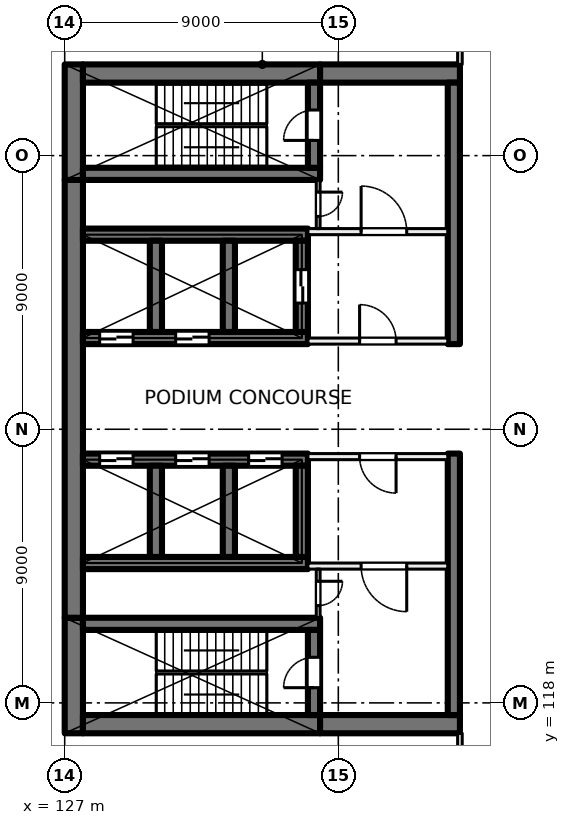
"""IFC4 building model, lengths in metres.
Left out: names, types, materials, properties, quantities, classifications, styles, units other than length and angle.
Written with IfcOpenShell. Run it as: python <this file> out.ifc"""

import sys

from ifc_helpers import new_model, si_unit, direction, frame, frame_2d, origin, place, context, subcontext, project, spatial, rectangle, extrude, element, fill, save


model = new_model("IFC4")
c1 = context("Model", 3, precision=1e-05, world=origin(), true_north=direction((0.0, 1.0)))
c2 = subcontext(c1, "Body", "Model", "MODEL_VIEW")
j1 = project(units=[si_unit("LENGTHUNIT", "METRE"), si_unit("PLANEANGLEUNIT", "RADIAN")], contexts=[c1])
p1 = place(None, origin())
s1 = spatial("IfcSite", under=j1, at=p1, CompositionType="ELEMENT")
p2 = place(p1, origin())
s2 = spatial("IfcBuilding", under=s1, at=p2, CompositionType="ELEMENT")
p3 = place(p2, frame((0.0, 0.0, 12.5)))
s3 = spatial("IfcBuildingStorey", under=s2, at=p3, CompositionType="ELEMENT", Elevation=12.5)
p4 = place(p3, frame((127.3, 117.0, 0.0), z_axis=(0.0, 0.0, 1.0), x_axis=(0.0, 1.0, 0.0)))
e1 = element("IfcWall", 1, at=p4, inside=s3, PredefinedType="SHEAR", context=c2, shape_type="SweptSolid", body=[
    extrude(rectangle(XDim=3.8, YDim=0.6, at=frame_2d((1.9, 0.0))), origin(), (0.0, 0.0, 1.0), 5.0),
])
p5 = place(p3, frame((127.3, 120.8, 0.0), z_axis=(0.0, 0.0, 1.0), x_axis=(0.0, 1.0, 0.0)))
e2 = element("IfcWall", 2, at=p5, inside=s3, PredefinedType="SHEAR", context=c2, shape_type="SweptSolid", body=[
    extrude(rectangle(XDim=14.4, YDim=0.6, at=frame_2d((7.2, 0.0))), origin(), (0.0, 0.0, 1.0), 5.0),
])
p6 = place(p3, frame((127.3, 135.2, 0.0), z_axis=(0.0, 0.0, 1.0), x_axis=(0.0, 1.0, 0.0)))
e3 = element("IfcWall", 3, at=p6, inside=s3, PredefinedType="SHEAR", context=c2, shape_type="SweptSolid", body=[
    extrude(rectangle(XDim=3.8, YDim=0.6, at=frame_2d((1.9, 0.0))), origin(), (0.0, 0.0, 1.0), 5.0),
])
for number, where, z_axis, x_axis in (
    (4, (127.6, 117.3, 0.0), (0.0, 0.0, 1.0), (1.0, 0.0, 0.0)),
    (5, (127.6, 138.7, 0.0), (0.0, 0.0, 1.0), (1.0, 0.0, 0.0)),
):
    element("IfcWall", number, at=place(p3, frame(where, z_axis=z_axis, x_axis=x_axis)), inside=s3, PredefinedType="SHEAR", context=c2, shape_type="SweptSolid", body=[
        extrude(rectangle(XDim=7.8, YDim=0.6, at=frame_2d((3.9, 0.0))), origin(), (0.0, 0.0, 1.0), 5.0),
    ])
for number, where, z_axis, x_axis in (
    (6, (135.4, 117.3, 0.0), (0.0, 0.0, 1.0), (1.0, 0.0, 0.0)),
    (7, (135.4, 138.7, 0.0), (0.0, 0.0, 1.0), (1.0, 0.0, 0.0)),
):
    element("IfcWall", number, at=place(p3, frame(where, z_axis=z_axis, x_axis=x_axis)), inside=s3, PredefinedType="SHEAR", context=c2, shape_type="SweptSolid", body=[
        extrude(rectangle(XDim=4.6, YDim=0.6, at=frame_2d((2.3, 0.0))), origin(), (0.0, 0.0, 1.0), 5.0),
    ])
p7 = place(p3, frame((127.6, 120.6, 0.0), z_axis=(0.0, 0.0, 1.0), x_axis=(1.0, 0.0, 0.0)))
e8 = element("IfcWall", 8, at=p7, inside=s3, PredefinedType="SHEAR", context=c2, shape_type="SweptSolid", body=[
    extrude(rectangle(XDim=7.8, YDim=0.4, at=frame_2d((3.9, 0.0))), origin(), (0.0, 0.0, 1.0), 5.0),
])
p8 = place(p3, frame((135.2, 117.6, 0.0), z_axis=(0.0, 0.0, 1.0), x_axis=(0.0, 1.0, 0.0)))
e9 = element("IfcWall", 9, at=p8, inside=s3, PredefinedType="SHEAR", context=c2, shape_type="SweptSolid", body=[
    extrude(rectangle(XDim=2.8, YDim=0.4, at=frame_2d((1.4, 0.0))), origin(), (0.0, 0.0, 1.0), 5.0),
])
p9 = place(p8, frame((0.9, 0.0, 0.0)))
e10 = element("IfcOpeningElement", 10, at=p9, cuts=e9, PredefinedType="OPENING", context=c2, shape_type="SweptSolid", body=[
    extrude(rectangle(XDim=1.0, YDim=2.1, at=frame_2d((0.5, 1.05))), frame((0.0, 0.21, 0.0), z_axis=(0.0, -1.0, 0.0), x_axis=(1.0, 0.0, 0.0)), (0.0, 0.0, 1.0), 0.42),
])
p10 = place(p3, frame((127.6, 135.4, 0.0), z_axis=(0.0, 0.0, 1.0), x_axis=(1.0, 0.0, 0.0)))
e11 = element("IfcWall", 11, at=p10, inside=s3, PredefinedType="SHEAR", context=c2, shape_type="SweptSolid", body=[
    extrude(rectangle(XDim=7.8, YDim=0.4, at=frame_2d((3.9, 0.0))), origin(), (0.0, 0.0, 1.0), 5.0),
])
p11 = place(p3, frame((135.2, 135.6, 0.0), z_axis=(0.0, 0.0, 1.0), x_axis=(0.0, 1.0, 0.0)))
e12 = element("IfcWall", 12, at=p11, inside=s3, PredefinedType="SHEAR", context=c2, shape_type="SweptSolid", body=[
    extrude(rectangle(XDim=2.8, YDim=0.4, at=frame_2d((1.4, 0.0))), origin(), (0.0, 0.0, 1.0), 5.0),
])
p12 = place(p11, frame((0.9, 0.0, 0.0)))
e13 = element("IfcOpeningElement", 13, at=p12, cuts=e12, PredefinedType="OPENING", context=c2, shape_type="SweptSolid", body=[
    extrude(rectangle(XDim=1.0, YDim=2.1, at=frame_2d((0.5, 1.05))), frame((0.0, 0.21, 0.0), z_axis=(0.0, -1.0, 0.0), x_axis=(1.0, 0.0, 0.0)), (0.0, 0.0, 1.0), 0.42),
])
p13 = place(p3, frame((127.6, 126.0, 0.0), z_axis=(0.0, 0.0, 1.0), x_axis=(1.0, 0.0, 0.0)))
e14 = element("IfcWall", 14, at=p13, inside=s3, PredefinedType="SHEAR", context=c2, shape_type="SweptSolid", body=[
    extrude(rectangle(XDim=7.4, YDim=0.4, at=frame_2d((3.7, 0.0))), origin(), (0.0, 0.0, 1.0), 5.0),
])
p14 = place(p13, frame((0.55, 0.0, 0.0)))
e15 = element("IfcOpeningElement", 15, at=p14, cuts=e14, PredefinedType="OPENING", context=c2, shape_type="SweptSolid", body=[
    extrude(rectangle(XDim=1.1, YDim=2.1, at=frame_2d((0.55, 1.05))), frame((0.0, 0.21, 0.0), z_axis=(0.0, -1.0, 0.0), x_axis=(1.0, 0.0, 0.0)), (0.0, 0.0, 1.0), 0.42),
])
p15 = place(p13, frame((3.05, 0.0, 0.0)))
e16 = element("IfcOpeningElement", 16, at=p15, cuts=e14, PredefinedType="OPENING", context=c2, shape_type="SweptSolid", body=[
    extrude(rectangle(XDim=1.1, YDim=2.1, at=frame_2d((0.55, 1.05))), frame((0.0, 0.21, 0.0), z_axis=(0.0, -1.0, 0.0), x_axis=(1.0, 0.0, 0.0)), (0.0, 0.0, 1.0), 0.42),
])
p16 = place(p13, frame((5.45, 0.0, 0.0)))
e17 = element("IfcOpeningElement", 17, at=p16, cuts=e14, PredefinedType="OPENING", context=c2, shape_type="SweptSolid", body=[
    extrude(rectangle(XDim=1.1, YDim=2.1, at=frame_2d((0.55, 1.05))), frame((0.0, 0.21, 0.0), z_axis=(0.0, -1.0, 0.0), x_axis=(1.0, 0.0, 0.0)), (0.0, 0.0, 1.0), 0.42),
])
p17 = place(p3, frame((127.6, 122.6, 0.0), z_axis=(0.0, 0.0, 1.0), x_axis=(1.0, 0.0, 0.0)))
e18 = element("IfcWall", 18, at=p17, inside=s3, PredefinedType="SHEAR", context=c2, shape_type="SweptSolid", body=[
    extrude(rectangle(XDim=7.4, YDim=0.4, at=frame_2d((3.7, 0.0))), origin(), (0.0, 0.0, 1.0), 5.0),
])
for number, where, z_axis, x_axis in (
    (19, (130.0, 122.8, 0.0), (0.0, 0.0, 1.0), (0.0, 1.0, 0.0)),
    (20, (132.4, 122.8, 0.0), (0.0, 0.0, 1.0), (0.0, 1.0, 0.0)),
    (21, (134.8, 122.8, 0.0), (0.0, 0.0, 1.0), (0.0, 1.0, 0.0)),
):
    element("IfcWall", number, at=place(p3, frame(where, z_axis=z_axis, x_axis=x_axis)), inside=s3, PredefinedType="SHEAR", context=c2, shape_type="SweptSolid", body=[
        extrude(rectangle(XDim=3.0, YDim=0.4, at=frame_2d((1.5, 0.0))), origin(), (0.0, 0.0, 1.0), 5.0),
    ])
p18 = place(p3, frame((127.6, 130.0, 0.0), z_axis=(0.0, 0.0, 1.0), x_axis=(1.0, 0.0, 0.0)))
e22 = element("IfcWall", 22, at=p18, inside=s3, PredefinedType="SHEAR", context=c2, shape_type="SweptSolid", body=[
    extrude(rectangle(XDim=7.4, YDim=0.4, at=frame_2d((3.7, 0.0))), origin(), (0.0, 0.0, 1.0), 5.0),
])
p19 = place(p18, frame((0.55, 0.0, 0.0)))
e23 = element("IfcOpeningElement", 23, at=p19, cuts=e22, PredefinedType="OPENING", context=c2, shape_type="SweptSolid", body=[
    extrude(rectangle(XDim=1.1, YDim=2.1, at=frame_2d((0.55, 1.05))), frame((0.0, 0.21, 0.0), z_axis=(0.0, -1.0, 0.0), x_axis=(1.0, 0.0, 0.0)), (0.0, 0.0, 1.0), 0.42),
])
p20 = place(p18, frame((3.05, 0.0, 0.0)))
e24 = element("IfcOpeningElement", 24, at=p20, cuts=e22, PredefinedType="OPENING", context=c2, shape_type="SweptSolid", body=[
    extrude(rectangle(XDim=1.1, YDim=2.1, at=frame_2d((0.55, 1.05))), frame((0.0, 0.21, 0.0), z_axis=(0.0, -1.0, 0.0), x_axis=(1.0, 0.0, 0.0)), (0.0, 0.0, 1.0), 0.42),
])
p21 = place(p3, frame((127.6, 133.4, 0.0), z_axis=(0.0, 0.0, 1.0), x_axis=(1.0, 0.0, 0.0)))
e25 = element("IfcWall", 25, at=p21, inside=s3, PredefinedType="SHEAR", context=c2, shape_type="SweptSolid", body=[
    extrude(rectangle(XDim=7.4, YDim=0.4, at=frame_2d((3.7, 0.0))), origin(), (0.0, 0.0, 1.0), 5.0),
])
for number, where, z_axis, x_axis in (
    (26, (130.0, 130.2, 0.0), (0.0, 0.0, 1.0), (0.0, 1.0, 0.0)),
    (27, (132.4, 130.2, 0.0), (0.0, 0.0, 1.0), (0.0, 1.0, 0.0)),
):
    element("IfcWall", number, at=place(p3, frame(where, z_axis=z_axis, x_axis=x_axis)), inside=s3, PredefinedType="SHEAR", context=c2, shape_type="SweptSolid", body=[
        extrude(rectangle(XDim=3.0, YDim=0.4, at=frame_2d((1.5, 0.0))), origin(), (0.0, 0.0, 1.0), 5.0),
    ])
p22 = place(p3, frame((134.8, 130.2, 0.0), z_axis=(0.0, 0.0, 1.0), x_axis=(0.0, 1.0, 0.0)))
e28 = element("IfcWall", 28, at=p22, inside=s3, PredefinedType="SHEAR", context=c2, shape_type="SweptSolid", body=[
    extrude(rectangle(XDim=3.0, YDim=0.4, at=frame_2d((1.5, 0.0))), origin(), (0.0, 0.0, 1.0), 5.0),
])
p23 = place(p22, frame((0.95, 0.0, 0.0)))
e29 = element("IfcOpeningElement", 29, at=p23, cuts=e28, PredefinedType="OPENING", context=c2, shape_type="SweptSolid", body=[
    extrude(rectangle(XDim=1.1, YDim=2.1, at=frame_2d((0.55, 1.05))), frame((0.0, 0.21, 0.0), z_axis=(0.0, -1.0, 0.0), x_axis=(1.0, 0.0, 0.0)), (0.0, 0.0, 1.0), 0.42),
])
for number, where, z_axis, x_axis in (
    (30, (139.8, 117.6, 0.0), (0.0, 0.0, 1.0), (0.0, 1.0, 0.0)),
    (31, (139.8, 129.8, 0.0), (0.0, 0.0, 1.0), (0.0, 1.0, 0.0)),
):
    element("IfcWall", number, at=place(p3, frame(where, z_axis=z_axis, x_axis=x_axis)), inside=s3, PredefinedType="SHEAR", context=c2, shape_type="SweptSolid", body=[
        extrude(rectangle(XDim=8.6, YDim=0.4, at=frame_2d((4.3, 0.0))), origin(), (0.0, 0.0, 1.0), 5.0),
    ])
p24 = place(p3, frame((135.0, 129.9, 0.0), z_axis=(0.0, 0.0, 1.0), x_axis=(1.0, 0.0, 0.0)))
e32 = element("IfcWall", 32, at=p24, inside=s3, PredefinedType="PARTITIONING", context=c2, shape_type="SweptSolid", body=[
    extrude(rectangle(XDim=4.6, YDim=0.2, at=frame_2d((2.3, 0.0))), origin(), (0.0, 0.0, 1.0), 4.6),
])
p25 = place(p24, frame((1.7, 0.0, 0.0)))
e33 = element("IfcOpeningElement", 33, at=p25, cuts=e32, PredefinedType="OPENING", context=c2, shape_type="SweptSolid", body=[
    extrude(rectangle(XDim=1.2, YDim=2.1, at=frame_2d((0.6, 1.05))), frame((0.0, 0.11, 0.0), z_axis=(0.0, -1.0, 0.0), x_axis=(1.0, 0.0, 0.0)), (0.0, 0.0, 1.0), 0.22),
])
p26 = place(p3, frame((135.0, 133.5, 0.0), z_axis=(0.0, 0.0, 1.0), x_axis=(1.0, 0.0, 0.0)))
e34 = element("IfcWall", 34, at=p26, inside=s3, PredefinedType="PARTITIONING", context=c2, shape_type="SweptSolid", body=[
    extrude(rectangle(XDim=4.6, YDim=0.2, at=frame_2d((2.3, 0.0))), origin(), (0.0, 0.0, 1.0), 4.6),
])
p27 = place(p26, frame((1.75, 0.0, 0.0)))
e35 = element("IfcOpeningElement", 35, at=p27, cuts=e34, PredefinedType="OPENING", context=c2, shape_type="SweptSolid", body=[
    extrude(rectangle(XDim=1.5, YDim=2.1, at=frame_2d((0.75, 1.05))), frame((0.0, 0.11, 0.0), z_axis=(0.0, -1.0, 0.0), x_axis=(1.0, 0.0, 0.0)), (0.0, 0.0, 1.0), 0.22),
])
p28 = place(p3, frame((135.337, 135.2, 0.0), z_axis=(0.0, 0.0, 1.0), x_axis=(0.0, -1.0, 0.0)))
e36 = element("IfcWall", 36, at=p28, inside=s3, PredefinedType="PARTITIONING", context=c2, shape_type="SweptSolid", body=[
    extrude(rectangle(XDim=1.6, YDim=0.125, at=frame_2d((0.8, 0.0))), origin(), (0.0, 0.0, 1.0), 4.6),
])
p29 = place(p28, frame((0.4, 0.0, 0.0)))
e37 = element("IfcOpeningElement", 37, at=p29, cuts=e36, PredefinedType="OPENING", context=c2, shape_type="SweptSolid", body=[
    extrude(rectangle(XDim=0.8, YDim=2.1, at=frame_2d((0.4, 1.05))), frame((0.0, 0.073, 0.0), z_axis=(0.0, -1.0, 0.0), x_axis=(1.0, 0.0, 0.0)), (0.0, 0.0, 1.0), 0.145),
])
p30 = place(p3, frame((139.6, 126.1, 0.0), z_axis=(0.0, 0.0, 1.0), x_axis=(-1.0, 0.0, 0.0)))
e38 = element("IfcWall", 38, at=p30, inside=s3, PredefinedType="PARTITIONING", context=c2, shape_type="SweptSolid", body=[
    extrude(rectangle(XDim=4.6, YDim=0.2, at=frame_2d((2.3, 0.0))), origin(), (0.0, 0.0, 1.0), 4.6),
])
p31 = place(p30, frame((1.7, 0.0, 0.0)))
e39 = element("IfcOpeningElement", 39, at=p31, cuts=e38, PredefinedType="OPENING", context=c2, shape_type="SweptSolid", body=[
    extrude(rectangle(XDim=1.2, YDim=2.1, at=frame_2d((0.6, 1.05))), frame((0.0, 0.11, 0.0), z_axis=(0.0, -1.0, 0.0), x_axis=(1.0, 0.0, 0.0)), (0.0, 0.0, 1.0), 0.22),
])
p32 = place(p3, frame((139.6, 122.5, 0.0), z_axis=(0.0, 0.0, 1.0), x_axis=(-1.0, 0.0, 0.0)))
e40 = element("IfcWall", 40, at=p32, inside=s3, PredefinedType="PARTITIONING", context=c2, shape_type="SweptSolid", body=[
    extrude(rectangle(XDim=4.6, YDim=0.2, at=frame_2d((2.3, 0.0))), origin(), (0.0, 0.0, 1.0), 4.6),
])
p33 = place(p32, frame((1.35, 0.0, 0.0)))
e41 = element("IfcOpeningElement", 41, at=p33, cuts=e40, PredefinedType="OPENING", context=c2, shape_type="SweptSolid", body=[
    extrude(rectangle(XDim=1.5, YDim=2.1, at=frame_2d((0.75, 1.05))), frame((0.0, 0.11, 0.0), z_axis=(0.0, -1.0, 0.0), x_axis=(1.0, 0.0, 0.0)), (0.0, 0.0, 1.0), 0.22),
])
p34 = place(p3, frame((135.337, 122.4, 0.0), z_axis=(0.0, 0.0, 1.0), x_axis=(0.0, -1.0, 0.0)))
e42 = element("IfcWall", 42, at=p34, inside=s3, PredefinedType="PARTITIONING", context=c2, shape_type="SweptSolid", body=[
    extrude(rectangle(XDim=1.6, YDim=0.125, at=frame_2d((0.8, 0.0))), origin(), (0.0, 0.0, 1.0), 4.6),
])
p35 = place(p34, frame((0.4, 0.0, 0.0)))
e43 = element("IfcOpeningElement", 43, at=p35, cuts=e42, PredefinedType="OPENING", context=c2, shape_type="SweptSolid", body=[
    extrude(rectangle(XDim=0.8, YDim=2.1, at=frame_2d((0.4, 1.05))), frame((0.0, 0.073, 0.0), z_axis=(0.0, -1.0, 0.0), x_axis=(1.0, 0.0, 0.0)), (0.0, 0.0, 1.0), 0.145),
])
p36 = place(p3, frame((140.0, 102.925, 0.0), z_axis=(0.0, 0.0, 1.0), x_axis=(0.0, 1.0, 0.0)))
e44 = element("IfcWall", 44, at=p36, inside=s3, PredefinedType="PARTITIONING", context=c2, shape_type="SweptSolid", body=[
    extrude(rectangle(XDim=14.075, YDim=0.15, at=frame_2d((7.038, 0.0))), origin(), (0.0, 0.0, 1.0), 4.6),
])
p37 = place(p36, frame((10.675, 0.0, 0.0)))
e45 = element("IfcOpeningElement", 45, at=p37, cuts=e44, PredefinedType="OPENING", context=c2, shape_type="SweptSolid", body=[
    extrude(rectangle(XDim=1.8, YDim=2.1, at=frame_2d((0.9, 1.05))), frame((0.0, 0.085, 0.0), z_axis=(0.0, -1.0, 0.0), x_axis=(1.0, 0.0, 0.0)), (0.0, 0.0, 1.0), 0.17),
])
p38 = place(p3, frame((140.0, 139.0, 0.0), z_axis=(0.0, 0.0, 1.0), x_axis=(0.0, 1.0, 0.0)))
e46 = element("IfcWall", 46, at=p38, inside=s3, PredefinedType="PARTITIONING", context=c2, shape_type="SweptSolid", body=[
    extrude(rectangle(XDim=14.4, YDim=0.15, at=frame_2d((7.2, 0.0))), origin(), (0.0, 0.0, 1.0), 4.6),
])
p39 = place(p19, origin())
e47 = element("IfcDoor", 47, at=p39, inside=s3, OperationType="DOUBLE_DOOR_SLIDING", PredefinedType="DOOR", context=c2, shape_type="SweptSolid", body=[
    extrude(rectangle(XDim=1.1, YDim=2.1, at=frame_2d((0.55, 1.05))), frame((0.0, 0.025, 0.0), z_axis=(0.0, -1.0, 0.0), x_axis=(1.0, 0.0, 0.0)), (0.0, 0.0, 1.0), 0.05),
])
fill(e23, e47)
p40 = place(p20, origin())
e48 = element("IfcDoor", 48, at=p40, inside=s3, OperationType="DOUBLE_DOOR_SLIDING", PredefinedType="DOOR", context=c2, shape_type="SweptSolid", body=[
    extrude(rectangle(XDim=1.1, YDim=2.1, at=frame_2d((0.55, 1.05))), frame((0.0, 0.025, 0.0), z_axis=(0.0, -1.0, 0.0), x_axis=(1.0, 0.0, 0.0)), (0.0, 0.0, 1.0), 0.05),
])
fill(e24, e48)
p41 = place(p14, origin())
e49 = element("IfcDoor", 49, at=p41, inside=s3, OperationType="DOUBLE_DOOR_SLIDING", PredefinedType="DOOR", context=c2, shape_type="SweptSolid", body=[
    extrude(rectangle(XDim=1.1, YDim=2.1, at=frame_2d((0.55, 1.05))), frame((0.0, 0.025, 0.0), z_axis=(0.0, -1.0, 0.0), x_axis=(1.0, 0.0, 0.0)), (0.0, 0.0, 1.0), 0.05),
])
fill(e15, e49)
p42 = place(p15, origin())
e50 = element("IfcDoor", 50, at=p42, inside=s3, OperationType="DOUBLE_DOOR_SLIDING", PredefinedType="DOOR", context=c2, shape_type="SweptSolid", body=[
    extrude(rectangle(XDim=1.1, YDim=2.1, at=frame_2d((0.55, 1.05))), frame((0.0, 0.025, 0.0), z_axis=(0.0, -1.0, 0.0), x_axis=(1.0, 0.0, 0.0)), (0.0, 0.0, 1.0), 0.05),
])
fill(e16, e50)
p43 = place(p16, origin())
e51 = element("IfcDoor", 51, at=p43, inside=s3, OperationType="DOUBLE_DOOR_SLIDING", PredefinedType="DOOR", context=c2, shape_type="SweptSolid", body=[
    extrude(rectangle(XDim=1.1, YDim=2.1, at=frame_2d((0.55, 1.05))), frame((0.0, 0.025, 0.0), z_axis=(0.0, -1.0, 0.0), x_axis=(1.0, 0.0, 0.0)), (0.0, 0.0, 1.0), 0.05),
])
fill(e17, e51)
p44 = place(p25, origin())
e52 = element("IfcDoor", 52, at=p44, inside=s3, OperationType="DOUBLE_DOOR_SINGLE_SWING", PredefinedType="DOOR", context=c2, shape_type="SweptSolid", body=[
    extrude(rectangle(XDim=1.2, YDim=2.1, at=frame_2d((0.6, 1.05))), frame((0.0, 0.025, 0.0), z_axis=(0.0, -1.0, 0.0), x_axis=(1.0, 0.0, 0.0)), (0.0, 0.0, 1.0), 0.05),
])
fill(e33, e52)
p45 = place(p27, origin())
e53 = element("IfcDoor", 53, at=p45, inside=s3, OperationType="DOUBLE_DOOR_SINGLE_SWING", PredefinedType="DOOR", context=c2, shape_type="SweptSolid", body=[
    extrude(rectangle(XDim=1.5, YDim=2.1, at=frame_2d((0.75, 1.05))), frame((0.0, 0.025, 0.0), z_axis=(0.0, -1.0, 0.0), x_axis=(1.0, 0.0, 0.0)), (0.0, 0.0, 1.0), 0.05),
])
fill(e35, e53)
p46 = place(p12, origin())
e54 = element("IfcDoor", 54, at=p46, inside=s3, OperationType="SINGLE_SWING_LEFT", PredefinedType="DOOR", context=c2, shape_type="SweptSolid", body=[
    extrude(rectangle(XDim=1.0, YDim=2.1, at=frame_2d((0.5, 1.05))), frame((0.0, 0.025, 0.0), z_axis=(0.0, -1.0, 0.0), x_axis=(1.0, 0.0, 0.0)), (0.0, 0.0, 1.0), 0.05),
])
fill(e13, e54)
p47 = place(p29, origin())
e55 = element("IfcDoor", 55, at=p47, inside=s3, OperationType="SINGLE_SWING_RIGHT", PredefinedType="DOOR", context=c2, shape_type="SweptSolid", body=[
    extrude(rectangle(XDim=0.8, YDim=2.1, at=frame_2d((0.4, 1.05))), frame((0.0, 0.025, 0.0), z_axis=(0.0, -1.0, 0.0), x_axis=(1.0, 0.0, 0.0)), (0.0, 0.0, 1.0), 0.05),
])
fill(e37, e55)
p48 = place(p31, origin())
e56 = element("IfcDoor", 56, at=p48, inside=s3, OperationType="DOUBLE_DOOR_SINGLE_SWING", PredefinedType="DOOR", context=c2, shape_type="SweptSolid", body=[
    extrude(rectangle(XDim=1.2, YDim=2.1, at=frame_2d((0.6, 1.05))), frame((0.0, 0.025, 0.0), z_axis=(0.0, -1.0, 0.0), x_axis=(1.0, 0.0, 0.0)), (0.0, 0.0, 1.0), 0.05),
])
fill(e39, e56)
p49 = place(p33, origin())
e57 = element("IfcDoor", 57, at=p49, inside=s3, OperationType="DOUBLE_DOOR_SINGLE_SWING", PredefinedType="DOOR", context=c2, shape_type="SweptSolid", body=[
    extrude(rectangle(XDim=1.5, YDim=2.1, at=frame_2d((0.75, 1.05))), frame((0.0, 0.025, 0.0), z_axis=(0.0, -1.0, 0.0), x_axis=(1.0, 0.0, 0.0)), (0.0, 0.0, 1.0), 0.05),
])
fill(e41, e57)
p50 = place(p9, origin())
e58 = element("IfcDoor", 58, at=p50, inside=s3, OperationType="SINGLE_SWING_RIGHT", PredefinedType="DOOR", context=c2, shape_type="SweptSolid", body=[
    extrude(rectangle(XDim=1.0, YDim=2.1, at=frame_2d((0.5, 1.05))), frame((0.0, 0.025, 0.0), z_axis=(0.0, -1.0, 0.0), x_axis=(1.0, 0.0, 0.0)), (0.0, 0.0, 1.0), 0.05),
])
fill(e10, e58)
p51 = place(p35, origin())
e59 = element("IfcDoor", 59, at=p51, inside=s3, OperationType="SINGLE_SWING_LEFT", PredefinedType="DOOR", context=c2, shape_type="SweptSolid", body=[
    extrude(rectangle(XDim=0.8, YDim=2.1, at=frame_2d((0.4, 1.05))), frame((0.0, 0.025, 0.0), z_axis=(0.0, -1.0, 0.0), x_axis=(1.0, 0.0, 0.0)), (0.0, 0.0, 1.0), 0.05),
])
fill(e43, e59)
p52 = place(p23, origin())
e60 = element("IfcDoor", 60, at=p52, inside=s3, OperationType="DOUBLE_DOOR_SLIDING", PredefinedType="DOOR", context=c2, shape_type="SweptSolid", body=[
    extrude(rectangle(XDim=1.1, YDim=2.1, at=frame_2d((0.55, 1.05))), frame((0.0, 0.025, 0.0), z_axis=(0.0, -1.0, 0.0), x_axis=(1.0, 0.0, 0.0)), (0.0, 0.0, 1.0), 0.05),
])
fill(e29, e60)
save(model, sys.argv[1])
